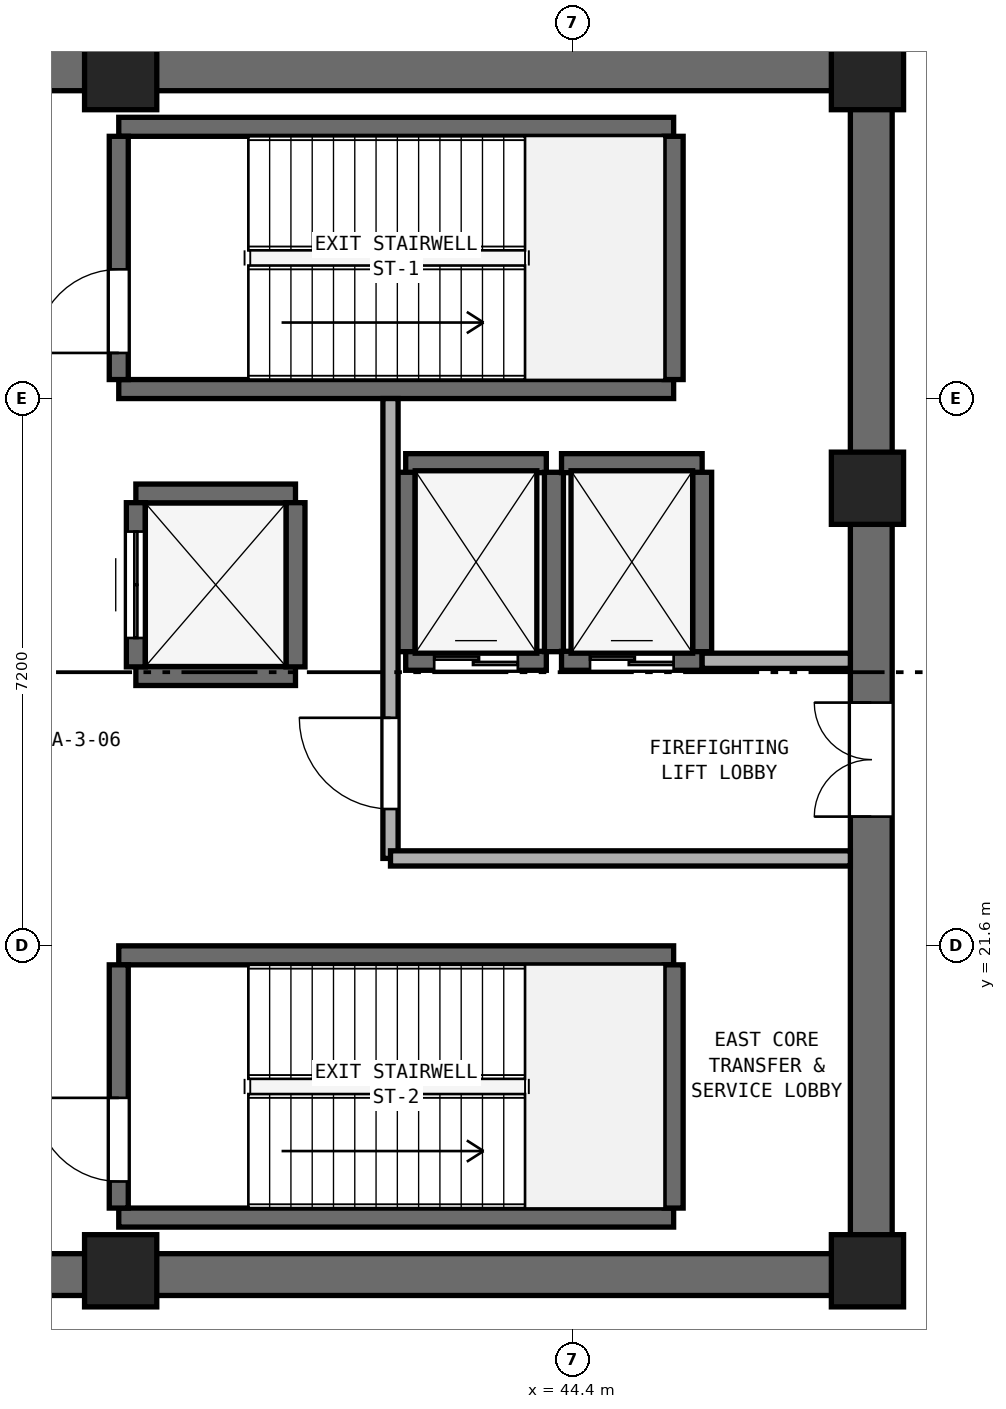
"""IFC4 building model, lengths in metres.
Left out: names, types, materials, properties, quantities, classifications, styles, units other than length and angle.
Written with IfcOpenShell. Run it as: python <this file> out.ifc"""

import sys

from ifc_helpers import new_model, si_unit, direction, frame, frame_2d, origin, origin_2d, place, context, subcontext, project, spatial, rectangle, extrude, element, fill, save


model = new_model("IFC4")
c1 = context("Model", 3, precision=1e-05, world=origin(), true_north=direction((0.0, 1.0)))
c2 = subcontext(c1, "Body", "Model", "MODEL_VIEW")
j1 = project(units=[si_unit("LENGTHUNIT", "METRE"), si_unit("PLANEANGLEUNIT", "RADIAN")], contexts=[c1])
p1 = place(None, origin())
s1 = spatial("IfcSite", under=j1, at=p1, CompositionType="ELEMENT")
p2 = place(p1, origin())
s2 = spatial("IfcBuilding", under=s1, at=p2, CompositionType="ELEMENT")
p3 = place(p2, frame((0.0, 0.0, 220.0)))
s3 = spatial("IfcBuildingStorey", under=s2, at=p3, CompositionType="ELEMENT", Elevation=220.0)
for number, where, z_axis, x_axis in (
    (1, (25.4, 17.275, 0.0), (0.0, 0.0, 1.0), (1.0, 0.0, 0.0)),
    (2, (25.4, 33.125, 0.0), (0.0, 0.0, 1.0), (1.0, 0.0, 0.0)),
):
    element("IfcWall", number, at=place(p3, frame(where, z_axis=z_axis, x_axis=x_axis)), inside=s3, PredefinedType="SHEAR", context=c2, shape_type="SweptSolid", body=[
        extrude(rectangle(XDim=23.2, YDim=0.55, at=frame_2d((11.6, 0.0))), origin(), (0.0, 0.0, 1.0), 4.71),
    ])
p4 = place(p3, frame((48.325, 17.55, 0.0), z_axis=(0.0, 0.0, 1.0), x_axis=(0.0, 1.0, 0.0)))
e3 = element("IfcWall", 3, at=p4, inside=s3, PredefinedType="SHEAR", context=c2, shape_type="SweptSolid", body=[
    extrude(rectangle(XDim=15.3, YDim=0.55, at=frame_2d((7.65, 0.0))), origin(), (0.0, 0.0, 1.0), 4.71),
])
p5 = place(p4, frame((5.75, 0.0, 0.0)))
e4 = element("IfcOpeningElement", 4, at=p5, cuts=e3, PredefinedType="OPENING", context=c2, shape_type="SweptSolid", body=[
    extrude(rectangle(XDim=1.5, YDim=2.15, at=frame_2d((0.75, 1.075))), frame((0.0, 0.285, 0.0), z_axis=(0.0, -1.0, 0.0), x_axis=(1.0, 0.0, 0.0)), (0.0, 0.0, 1.0), 0.57),
])
for number, where, z_axis, x_axis in (
    (5, (38.45, 17.325, 0.0), (0.0, 0.0, 1.0), (1.0, 0.0, 0.0)),
    (6, (48.275, 17.325, 0.0), (0.0, 0.0, 1.0), (1.0, 0.0, 0.0)),
    (7, (48.275, 27.62, 0.0), (0.0, 0.0, 1.0), (1.0, 0.0, 0.0)),
    (8, (48.275, 33.075, 0.0), (0.0, 0.0, 1.0), (1.0, 0.0, 0.0)),
    (9, (38.45, 33.075, 0.0), (0.0, 0.0, 1.0), (1.0, 0.0, 0.0)),
):
    element("IfcColumn", number, at=place(p3, frame(where, z_axis=z_axis, x_axis=x_axis)), inside=s3, PredefinedType="PILASTER", context=c2, shape_type="SweptSolid", body=[
        extrude(rectangle(XDim=0.95, YDim=0.95, at=origin_2d()), origin(), (0.0, 0.0, 1.0), 5.0),
    ])
for number, where, z_axis, x_axis in (
    (10, (38.425, 28.925, 0.0), (0.0, 0.0, 1.0), (1.0, 0.0, 0.0)),
    (11, (38.425, 32.375, 0.0), (0.0, 0.0, 1.0), (1.0, 0.0, 0.0)),
):
    element("IfcWall", number, at=place(p3, frame(where, z_axis=z_axis, x_axis=x_axis)), inside=s3, PredefinedType="SHEAR", context=c2, shape_type="SweptSolid", body=[
        extrude(rectangle(XDim=7.3, YDim=0.25, at=frame_2d((3.65, 0.0))), origin(), (0.0, 0.0, 1.0), 4.71),
    ])
p6 = place(p3, frame((38.425, 29.05, 0.0), z_axis=(0.0, 0.0, 1.0), x_axis=(0.0, 1.0, 0.0)))
e12 = element("IfcWall", 12, at=p6, inside=s3, PredefinedType="SHEAR", context=c2, shape_type="SweptSolid", body=[
    extrude(rectangle(XDim=3.2, YDim=0.25, at=frame_2d((1.6, 0.0))), origin(), (0.0, 0.0, 1.0), 4.71),
])
p7 = place(p6, frame((0.35, 0.0, 0.0)))
e13 = element("IfcOpeningElement", 13, at=p7, cuts=e12, PredefinedType="OPENING", context=c2, shape_type="SweptSolid", body=[
    extrude(rectangle(XDim=1.1, YDim=2.15, at=frame_2d((0.55, 1.075))), frame((0.0, 0.135, 0.0), z_axis=(0.0, -1.0, 0.0), x_axis=(1.0, 0.0, 0.0)), (0.0, 0.0, 1.0), 0.27),
])
p8 = place(p3, frame((45.725, 29.05, 0.0), z_axis=(0.0, 0.0, 1.0), x_axis=(0.0, 1.0, 0.0)))
e14 = element("IfcWall", 14, at=p8, inside=s3, PredefinedType="SHEAR", context=c2, shape_type="SweptSolid", body=[
    extrude(rectangle(XDim=3.2, YDim=0.25, at=frame_2d((1.6, 0.0))), origin(), (0.0, 0.0, 1.0), 4.71),
])
for number, where, z_axis, x_axis in (
    (15, (38.425, 18.025, 0.0), (0.0, 0.0, 1.0), (1.0, 0.0, 0.0)),
    (16, (38.425, 21.475, 0.0), (0.0, 0.0, 1.0), (1.0, 0.0, 0.0)),
):
    element("IfcWall", number, at=place(p3, frame(where, z_axis=z_axis, x_axis=x_axis)), inside=s3, PredefinedType="SHEAR", context=c2, shape_type="SweptSolid", body=[
        extrude(rectangle(XDim=7.3, YDim=0.25, at=frame_2d((3.65, 0.0))), origin(), (0.0, 0.0, 1.0), 4.71),
    ])
p9 = place(p3, frame((38.425, 18.15, 0.0), z_axis=(0.0, 0.0, 1.0), x_axis=(0.0, 1.0, 0.0)))
e17 = element("IfcWall", 17, at=p9, inside=s3, PredefinedType="SHEAR", context=c2, shape_type="SweptSolid", body=[
    extrude(rectangle(XDim=3.2, YDim=0.25, at=frame_2d((1.6, 0.0))), origin(), (0.0, 0.0, 1.0), 4.71),
])
p10 = place(p9, frame((0.35, 0.0, 0.0)))
e18 = element("IfcOpeningElement", 18, at=p10, cuts=e17, PredefinedType="OPENING", context=c2, shape_type="SweptSolid", body=[
    extrude(rectangle(XDim=1.1, YDim=2.15, at=frame_2d((0.55, 1.075))), frame((0.0, 0.135, 0.0), z_axis=(0.0, -1.0, 0.0), x_axis=(1.0, 0.0, 0.0)), (0.0, 0.0, 1.0), 0.27),
])
p11 = place(p3, frame((45.725, 18.15, 0.0), z_axis=(0.0, 0.0, 1.0), x_axis=(0.0, 1.0, 0.0)))
e19 = element("IfcWall", 19, at=p11, inside=s3, PredefinedType="SHEAR", context=c2, shape_type="SweptSolid", body=[
    extrude(rectangle(XDim=3.2, YDim=0.25, at=frame_2d((1.6, 0.0))), origin(), (0.0, 0.0, 1.0), 4.71),
])
p12 = place(p3, frame((42.2, 25.35, 0.0), z_axis=(0.0, 0.0, 1.0), x_axis=(1.0, 0.0, 0.0)))
e20 = element("IfcWall", 20, at=p12, inside=s3, PredefinedType="SHEAR", context=c2, shape_type="SweptSolid", body=[
    extrude(rectangle(XDim=1.85, YDim=0.25, at=frame_2d((0.925, 0.0))), origin(), (0.0, 0.0, 1.0), 4.71),
])
p13 = place(p12, frame((0.375, 0.0, 0.0)))
e21 = element("IfcOpeningElement", 21, at=p13, cuts=e20, PredefinedType="OPENING", context=c2, shape_type="SweptSolid", body=[
    extrude(rectangle(XDim=1.1, YDim=2.15, at=frame_2d((0.55, 1.075))), frame((0.0, 0.135, 0.0), z_axis=(0.0, -1.0, 0.0), x_axis=(1.0, 0.0, 0.0)), (0.0, 0.0, 1.0), 0.27),
])
p14 = place(p3, frame((42.2, 27.95, 0.0), z_axis=(0.0, 0.0, 1.0), x_axis=(1.0, 0.0, 0.0)))
e22 = element("IfcWall", 22, at=p14, inside=s3, PredefinedType="SHEAR", context=c2, shape_type="SweptSolid", body=[
    extrude(rectangle(XDim=1.85, YDim=0.25, at=frame_2d((0.925, 0.0))), origin(), (0.0, 0.0, 1.0), 4.71),
])
for number, where, z_axis, x_axis in (
    (23, (42.2, 25.47, 0.0), (0.0, 0.0, 1.0), (0.0, 1.0, 0.0)),
    (24, (44.15, 25.47, 0.0), (0.0, 0.0, 1.0), (0.0, 1.0, 0.0)),
):
    element("IfcWall", number, at=place(p3, frame(where, z_axis=z_axis, x_axis=x_axis)), inside=s3, PredefinedType="SHEAR", context=c2, shape_type="SweptSolid", body=[
        extrude(rectangle(XDim=2.36, YDim=0.25, at=frame_2d((1.18, 0.0))), origin(), (0.0, 0.0, 1.0), 4.71),
    ])
p15 = place(p3, frame((44.25, 25.35, 0.0), z_axis=(0.0, 0.0, 1.0), x_axis=(1.0, 0.0, 0.0)))
e25 = element("IfcWall", 25, at=p15, inside=s3, PredefinedType="SHEAR", context=c2, shape_type="SweptSolid", body=[
    extrude(rectangle(XDim=1.85, YDim=0.25, at=frame_2d((0.925, 0.0))), origin(), (0.0, 0.0, 1.0), 4.71),
])
p16 = place(p15, frame((0.375, 0.0, 0.0)))
e26 = element("IfcOpeningElement", 26, at=p16, cuts=e25, PredefinedType="OPENING", context=c2, shape_type="SweptSolid", body=[
    extrude(rectangle(XDim=1.1, YDim=2.15, at=frame_2d((0.55, 1.075))), frame((0.0, 0.135, 0.0), z_axis=(0.0, -1.0, 0.0), x_axis=(1.0, 0.0, 0.0)), (0.0, 0.0, 1.0), 0.27),
])
p17 = place(p3, frame((44.25, 27.95, 0.0), z_axis=(0.0, 0.0, 1.0), x_axis=(1.0, 0.0, 0.0)))
e27 = element("IfcWall", 27, at=p17, inside=s3, PredefinedType="SHEAR", context=c2, shape_type="SweptSolid", body=[
    extrude(rectangle(XDim=1.85, YDim=0.25, at=frame_2d((0.925, 0.0))), origin(), (0.0, 0.0, 1.0), 4.71),
])
p18 = place(p3, frame((46.1, 25.47, 0.0), z_axis=(0.0, 0.0, 1.0), x_axis=(0.0, 1.0, 0.0)))
e28 = element("IfcWall", 28, at=p18, inside=s3, PredefinedType="SHEAR", context=c2, shape_type="SweptSolid", body=[
    extrude(rectangle(XDim=2.36, YDim=0.25, at=frame_2d((1.18, 0.0))), origin(), (0.0, 0.0, 1.0), 4.71),
])
for number, where, z_axis, x_axis in (
    (29, (38.65, 25.15, 0.0), (0.0, 0.0, 1.0), (1.0, 0.0, 0.0)),
    (30, (38.65, 27.55, 0.0), (0.0, 0.0, 1.0), (1.0, 0.0, 0.0)),
):
    element("IfcWall", number, at=place(p3, frame(where, z_axis=z_axis, x_axis=x_axis)), inside=s3, PredefinedType="SHEAR", context=c2, shape_type="SweptSolid", body=[
        extrude(rectangle(XDim=2.1, YDim=0.25, at=frame_2d((1.05, 0.0))), origin(), (0.0, 0.0, 1.0), 4.71),
    ])
p19 = place(p3, frame((38.65, 25.27, 0.0), z_axis=(0.0, 0.0, 1.0), x_axis=(0.0, 1.0, 0.0)))
e31 = element("IfcWall", 31, at=p19, inside=s3, PredefinedType="SHEAR", context=c2, shape_type="SweptSolid", body=[
    extrude(rectangle(XDim=2.16, YDim=0.25, at=frame_2d((1.08, 0.0))), origin(), (0.0, 0.0, 1.0), 4.71),
])
p20 = place(p19, frame((0.38, 0.0, 0.0)))
e32 = element("IfcOpeningElement", 32, at=p20, cuts=e31, PredefinedType="OPENING", context=c2, shape_type="SweptSolid", body=[
    extrude(rectangle(XDim=1.4, YDim=2.2, at=frame_2d((0.7, 1.1))), frame((0.0, 0.135, 0.0), z_axis=(0.0, -1.0, 0.0), x_axis=(1.0, 0.0, 0.0)), (0.0, 0.0, 1.0), 0.27),
])
p21 = place(p3, frame((40.75, 25.27, 0.0), z_axis=(0.0, 0.0, 1.0), x_axis=(0.0, 1.0, 0.0)))
e33 = element("IfcWall", 33, at=p21, inside=s3, PredefinedType="SHEAR", context=c2, shape_type="SweptSolid", body=[
    extrude(rectangle(XDim=2.16, YDim=0.25, at=frame_2d((1.08, 0.0))), origin(), (0.0, 0.0, 1.0), 4.71),
])
p22 = place(p3, frame((42.0, 22.75, 0.0), z_axis=(0.0, 0.0, 1.0), x_axis=(0.0, 1.0, 0.0)))
e34 = element("IfcWall", 34, at=p22, inside=s3, PredefinedType="SOLIDWALL", context=c2, shape_type="SweptSolid", body=[
    extrude(rectangle(XDim=6.05, YDim=0.2, at=frame_2d((3.025, 0.0))), origin(), (0.0, 0.0, 1.0), 4.71),
])
p23 = place(p22, frame((0.65, 0.0, 0.0)))
e35 = element("IfcOpeningElement", 35, at=p23, cuts=e34, PredefinedType="OPENING", context=c2, shape_type="SweptSolid", body=[
    extrude(rectangle(XDim=1.2, YDim=2.15, at=frame_2d((0.6, 1.075))), frame((0.0, 0.11, 0.0), z_axis=(0.0, -1.0, 0.0), x_axis=(1.0, 0.0, 0.0)), (0.0, 0.0, 1.0), 0.22),
])
p24 = place(p3, frame((42.0, 22.75, 0.0), z_axis=(0.0, 0.0, 1.0), x_axis=(1.0, 0.0, 0.0)))
e36 = element("IfcWall", 36, at=p24, inside=s3, PredefinedType="SOLIDWALL", context=c2, shape_type="SweptSolid", body=[
    extrude(rectangle(XDim=6.05, YDim=0.2, at=frame_2d((3.025, 0.0))), origin(), (0.0, 0.0, 1.0), 4.71),
])
p25 = place(p3, frame((46.1, 25.35, 0.0), z_axis=(0.0, 0.0, 1.0), x_axis=(1.0, 0.0, 0.0)))
e37 = element("IfcWall", 37, at=p25, inside=s3, PredefinedType="SOLIDWALL", context=c2, shape_type="SweptSolid", body=[
    extrude(rectangle(XDim=1.95, YDim=0.2, at=frame_2d((0.975, 0.0))), origin(), (0.0, 0.0, 1.0), 4.71),
])
p26 = place(p7, origin())
e38 = element("IfcDoor", 38, at=p26, inside=s3, OperationType="SINGLE_SWING_LEFT", PredefinedType="DOOR", context=c2, shape_type="SweptSolid", body=[
    extrude(rectangle(XDim=1.1, YDim=2.15, at=frame_2d((0.55, 1.075))), frame((0.0, 0.025, 0.0), z_axis=(0.0, -1.0, 0.0), x_axis=(1.0, 0.0, 0.0)), (0.0, 0.0, 1.0), 0.05),
])
fill(e13, e38)
p27 = place(p10, origin())
e39 = element("IfcDoor", 39, at=p27, inside=s3, OperationType="SINGLE_SWING_RIGHT", PredefinedType="DOOR", context=c2, shape_type="SweptSolid", body=[
    extrude(rectangle(XDim=1.1, YDim=2.15, at=frame_2d((0.55, 1.075))), frame((0.0, 0.025, 0.0), z_axis=(0.0, -1.0, 0.0), x_axis=(1.0, 0.0, 0.0)), (0.0, 0.0, 1.0), 0.05),
])
fill(e18, e39)
p28 = place(p13, origin())
e40 = element("IfcDoor", 40, at=p28, inside=s3, OperationType="DOUBLE_DOOR_SLIDING", PredefinedType="DOOR", context=c2, shape_type="SweptSolid", body=[
    extrude(rectangle(XDim=1.1, YDim=2.15, at=frame_2d((0.55, 1.075))), frame((0.0, 0.025, 0.0), z_axis=(0.0, -1.0, 0.0), x_axis=(1.0, 0.0, 0.0)), (0.0, 0.0, 1.0), 0.05),
])
fill(e21, e40)
p29 = place(p16, origin())
e41 = element("IfcDoor", 41, at=p29, inside=s3, OperationType="DOUBLE_DOOR_SLIDING", PredefinedType="DOOR", context=c2, shape_type="SweptSolid", body=[
    extrude(rectangle(XDim=1.1, YDim=2.15, at=frame_2d((0.55, 1.075))), frame((0.0, 0.025, 0.0), z_axis=(0.0, -1.0, 0.0), x_axis=(1.0, 0.0, 0.0)), (0.0, 0.0, 1.0), 0.05),
])
fill(e26, e41)
p30 = place(p20, origin())
e42 = element("IfcDoor", 42, at=p30, inside=s3, OperationType="DOUBLE_DOOR_SLIDING", PredefinedType="DOOR", context=c2, shape_type="SweptSolid", body=[
    extrude(rectangle(XDim=1.4, YDim=2.2, at=frame_2d((0.7, 1.1))), frame((0.0, 0.025, 0.0), z_axis=(0.0, -1.0, 0.0), x_axis=(1.0, 0.0, 0.0)), (0.0, 0.0, 1.0), 0.05),
])
fill(e32, e42)
p31 = place(p23, origin())
e43 = element("IfcDoor", 43, at=p31, inside=s3, OperationType="SINGLE_SWING_RIGHT", PredefinedType="DOOR", context=c2, shape_type="SweptSolid", body=[
    extrude(rectangle(XDim=1.2, YDim=2.15, at=frame_2d((0.6, 1.075))), frame((0.0, 0.025, 0.0), z_axis=(0.0, -1.0, 0.0), x_axis=(1.0, 0.0, 0.0)), (0.0, 0.0, 1.0), 0.05),
])
fill(e35, e43)
p32 = place(p5, origin())
e44 = element("IfcDoor", 44, at=p32, inside=s3, OperationType="DOUBLE_DOOR_SINGLE_SWING", PredefinedType="DOOR", context=c2, shape_type="SweptSolid", body=[
    extrude(rectangle(XDim=1.5, YDim=2.15, at=frame_2d((0.75, 1.075))), frame((0.0, 0.025, 0.0), z_axis=(0.0, -1.0, 0.0), x_axis=(1.0, 0.0, 0.0)), (0.0, 0.0, 1.0), 0.05),
])
fill(e4, e44)
save(model, sys.argv[1])
